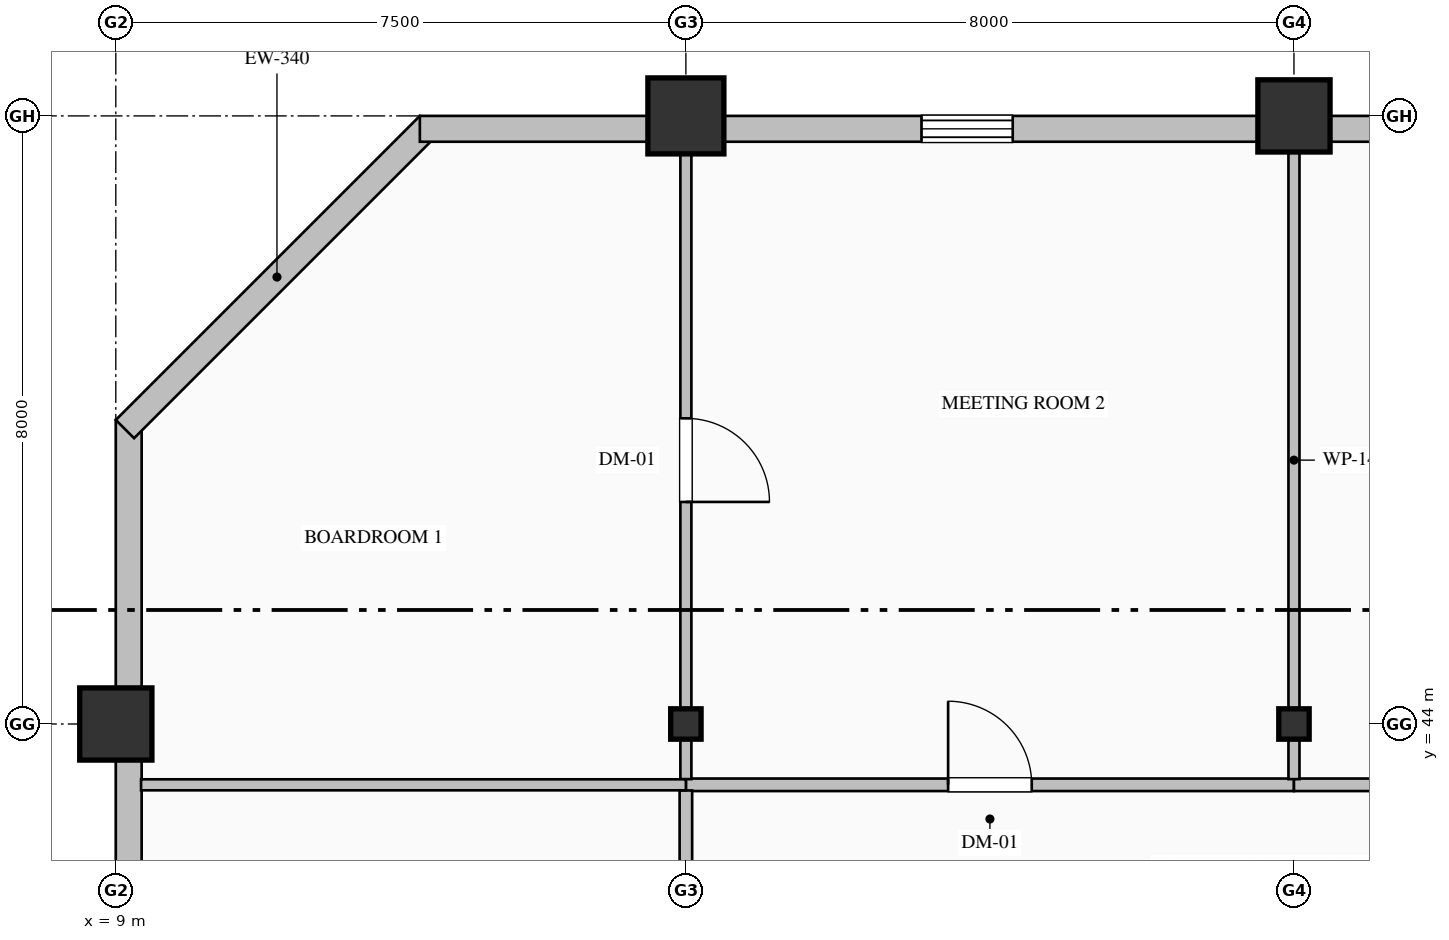
"""IFC4 building model, lengths in metres.
Left out: names, types, materials, properties, quantities, classifications, styles, units other than length and angle.
Written with IfcOpenShell. Run it as: python <this file> out.ifc"""

import sys

from ifc_helpers import new_model, si_unit, direction, frame, frame_2d, origin, origin_2d, place, context, subcontext, project, spatial, rectangle, hollow_rectangle, hollow_circle, i_section, extrude, element, fill, save


model = new_model("IFC4")
c1 = context("Model", 3, precision=1e-05, world=origin(), true_north=direction((0.0, 1.0)))
c2 = subcontext(c1, "Body", "Model", "MODEL_VIEW")
j1 = project(units=[si_unit("LENGTHUNIT", "METRE"), si_unit("PLANEANGLEUNIT", "RADIAN")], contexts=[c1])
p1 = place(None, origin())
s1 = spatial("IfcSite", under=j1, at=p1, CompositionType="ELEMENT")
p2 = place(p1, origin())
s2 = spatial("IfcBuilding", under=s1, at=p2, CompositionType="ELEMENT")
p3 = place(p2, frame((0.0, 0.0, 135.0)))
s3 = spatial("IfcBuildingStorey", under=s2, at=p3, CompositionType="ELEMENT", Elevation=135.0)
p4 = place(p3, frame((9.0, 44.0, 0.0), z_axis=(0.0, 0.0, 1.0), x_axis=(1.0, 0.0, 0.0)))
e1 = element("IfcColumn", 1, at=p4, inside=s3, PredefinedType="COLUMN", context=c2, shape_type="SweptSolid", body=[
    extrude(hollow_rectangle(XDim=0.95, YDim=0.95, WallThickness=0.036, at=origin_2d()), origin(), (0.0, 0.0, 1.0), 4.0),
])
p5 = place(p3, frame((16.5, 44.0, 0.0), z_axis=(0.0, 0.0, 1.0), x_axis=(1.0, 0.0, 0.0)))
e2 = element("IfcColumn", 2, at=p5, inside=s3, PredefinedType="COLUMN", context=c2, shape_type="SweptSolid", body=[
    extrude(i_section(OverallWidth=0.4, OverallDepth=0.4, WebThickness=0.013, FlangeThickness=0.021, FilletRadius=0.022, at=origin_2d()), origin(), (0.0, 0.0, 1.0), 4.0),
])
p6 = place(p3, frame((16.5, 52.0, 0.0), z_axis=(0.0, 0.0, 1.0), x_axis=(1.0, 0.0, 0.0)))
e3 = element("IfcColumn", 3, at=p6, inside=s3, PredefinedType="COLUMN", context=c2, shape_type="SweptSolid", body=[
    extrude(hollow_circle(Radius=0.5, WallThickness=0.036, at=origin_2d()), origin(), (0.0, 0.0, 1.0), 4.0),
])
p7 = place(p3, frame((24.5, 44.0, 0.0), z_axis=(0.0, 0.0, 1.0), x_axis=(1.0, 0.0, 0.0)))
e4 = element("IfcColumn", 4, at=p7, inside=s3, PredefinedType="COLUMN", context=c2, shape_type="SweptSolid", body=[
    extrude(i_section(OverallWidth=0.4, OverallDepth=0.4, WebThickness=0.013, FlangeThickness=0.021, FilletRadius=0.022, at=origin_2d()), origin(), (0.0, 0.0, 1.0), 4.0),
])
p8 = place(p3, frame((24.5, 52.0, 0.0), z_axis=(0.0, 0.0, 1.0), x_axis=(1.0, 0.0, 0.0)))
e5 = element("IfcColumn", 5, at=p8, inside=s3, PredefinedType="COLUMN", context=c2, shape_type="SweptSolid", body=[
    extrude(hollow_rectangle(XDim=0.95, YDim=0.95, WallThickness=0.036, at=origin_2d()), origin(), (0.0, 0.0, 1.0), 4.0),
])
p9 = place(p3, frame((9.17, 32.0, 0.0), z_axis=(0.0, 0.0, 1.0), x_axis=(0.0, 1.0, 0.0)))
e6 = element("IfcWall", 6, at=p9, inside=s3, PredefinedType="SOLIDWALL", context=c2, shape_type="SweptSolid", body=[
    extrude(rectangle(XDim=16.0, YDim=0.34, at=frame_2d((8.0, 0.0))), origin(), (0.0, 0.0, 1.0), 3.265),
])
p10 = place(p9, frame((6.45, 0.0, 0.85)))
e7 = element("IfcOpeningElement", 7, at=p10, cuts=e6, PredefinedType="OPENING", context=c2, shape_type="SweptSolid", body=[
    extrude(rectangle(XDim=1.5, YDim=1.95, at=frame_2d((0.75, 0.975))), frame((0.0, 0.18, 0.0), z_axis=(0.0, -1.0, 0.0), x_axis=(1.0, 0.0, 0.0)), (0.0, 0.0, 1.0), 0.36),
])
p11 = place(p3, frame((9.12, 47.88, 0.0), z_axis=(0.0, 0.0, 1.0), x_axis=(0.707106781187, 0.707106781187, 0.0)))
e8 = element("IfcWall", 8, at=p11, inside=s3, PredefinedType="SOLIDWALL", context=c2, shape_type="SweptSolid", body=[
    extrude(rectangle(XDim=5.657, YDim=0.34, at=frame_2d((2.828, 0.0))), origin(), (0.0, 0.0, 1.0), 3.765),
])
p12 = place(p3, frame((13.0, 51.83, 0.0), z_axis=(0.0, 0.0, 1.0), x_axis=(1.0, 0.0, 0.0)))
e9 = element("IfcWall", 9, at=p12, inside=s3, PredefinedType="SOLIDWALL", context=c2, shape_type="SweptSolid", body=[
    extrude(rectangle(XDim=27.52, YDim=0.34, at=frame_2d((13.76, 0.0))), origin(), (0.0, 0.0, 1.0), 3.265),
])
p13 = place(p12, frame((6.6, 0.0, 0.7)))
e10 = element("IfcOpeningElement", 10, at=p13, cuts=e9, PredefinedType="OPENING", context=c2, shape_type="SweptSolid", body=[
    extrude(rectangle(XDim=1.2, YDim=1.85, at=frame_2d((0.6, 0.925))), frame((0.0, 0.18, 0.0), z_axis=(0.0, -1.0, 0.0), x_axis=(1.0, 0.0, 0.0)), (0.0, 0.0, 1.0), 0.36),
])
p14 = place(p12, frame((13.575, 0.0, 0.85)))
e11 = element("IfcOpeningElement", 11, at=p14, cuts=e9, PredefinedType="OPENING", context=c2, shape_type="SweptSolid", body=[
    extrude(rectangle(XDim=1.65, YDim=1.95, at=frame_2d((0.825, 0.975))), frame((0.0, 0.18, 0.0), z_axis=(0.0, -1.0, 0.0), x_axis=(1.0, 0.0, 0.0)), (0.0, 0.0, 1.0), 0.36),
])
p15 = place(p3, frame((16.5, 43.2, 0.0), z_axis=(0.0, 0.0, 1.0), x_axis=(1.0, 0.0, 0.0)))
e12 = element("IfcWall", 12, at=p15, inside=s3, PredefinedType="PARTITIONING", context=c2, shape_type="SweptSolid", body=[
    extrude(rectangle(XDim=8.0, YDim=0.165, at=frame_2d((4.0, 0.0))), origin(), (0.0, 0.0, 1.0), 3.765),
])
p16 = place(p15, frame((3.45, 0.0, 0.0)))
e13 = element("IfcOpeningElement", 13, at=p16, cuts=e12, PredefinedType="OPENING", context=c2, shape_type="SweptSolid", body=[
    extrude(rectangle(XDim=1.1, YDim=2.2, at=frame_2d((0.55, 1.1))), frame((0.0, 0.093, 0.0), z_axis=(0.0, -1.0, 0.0), x_axis=(1.0, 0.0, 0.0)), (0.0, 0.0, 1.0), 0.185),
])
p17 = place(p3, frame((24.5, 43.2, 0.0), z_axis=(0.0, 0.0, 1.0), x_axis=(1.0, 0.0, 0.0)))
e14 = element("IfcWall", 14, at=p17, inside=s3, PredefinedType="PARTITIONING", context=c2, shape_type="SweptSolid", body=[
    extrude(rectangle(XDim=8.0, YDim=0.165, at=frame_2d((4.0, 0.0))), origin(), (0.0, 0.0, 1.0), 3.765),
])
p18 = place(p17, frame((3.5, 0.0, 0.0)))
e15 = element("IfcOpeningElement", 15, at=p18, cuts=e14, PredefinedType="OPENING", context=c2, shape_type="SweptSolid", body=[
    extrude(rectangle(XDim=1.0, YDim=2.15, at=frame_2d((0.5, 1.075))), frame((0.0, 0.093, 0.0), z_axis=(0.0, -1.0, 0.0), x_axis=(1.0, 0.0, 0.0)), (0.0, 0.0, 1.0), 0.185),
])
p19 = place(p3, frame((16.5, 41.0, 0.0), z_axis=(0.0, 0.0, 1.0), x_axis=(0.0, 1.0, 0.0)))
e16 = element("IfcWall", 16, at=p19, inside=s3, PredefinedType="PARTITIONING", context=c2, shape_type="SweptSolid", body=[
    extrude(rectangle(XDim=2.125, YDim=0.165, at=frame_2d((1.063, 0.0))), origin(), (0.0, 0.0, 1.0), 3.157),
])
p20 = place(p3, frame((16.5, 51.668, 0.0), z_axis=(0.0, 0.0, 1.0), x_axis=(0.0, -1.0, 0.0)))
e17 = element("IfcWall", 17, at=p20, inside=s3, PredefinedType="PARTITIONING", context=c2, shape_type="SweptSolid", body=[
    extrude(rectangle(XDim=8.394, YDim=0.145, at=frame_2d((4.197, 0.0))), origin(), (0.0, 0.0, 1.0), 3.157),
])
p21 = place(p20, frame((3.647, 0.0, 0.0)))
e18 = element("IfcOpeningElement", 18, at=p21, cuts=e17, PredefinedType="OPENING", context=c2, shape_type="SweptSolid", body=[
    extrude(rectangle(XDim=1.1, YDim=2.2, at=frame_2d((0.55, 1.1))), frame((0.0, 0.083, 0.0), z_axis=(0.0, -1.0, 0.0), x_axis=(1.0, 0.0, 0.0)), (0.0, 0.0, 1.0), 0.165),
])
p22 = place(p3, frame((16.5, 43.2, 0.0), z_axis=(0.0, 0.0, 1.0), x_axis=(-1.0, 0.0, 0.0)))
e19 = element("IfcWall", 19, at=p22, inside=s3, PredefinedType="PARTITIONING", context=c2, shape_type="SweptSolid", body=[
    extrude(rectangle(XDim=7.168, YDim=0.145, at=frame_2d((3.584, 0.0))), origin(), (0.0, 0.0, 1.0), 3.765),
])
p23 = place(p3, frame((24.5, 51.668, 0.0), z_axis=(0.0, 0.0, 1.0), x_axis=(0.0, -1.0, 0.0)))
e20 = element("IfcWall", 20, at=p23, inside=s3, PredefinedType="PARTITIONING", context=c2, shape_type="SweptSolid", body=[
    extrude(rectangle(XDim=8.394, YDim=0.145, at=frame_2d((4.197, 0.0))), origin(), (0.0, 0.0, 1.0), 3.157),
])
p24 = place(p13, origin())
e21 = element("IfcWindow", 21, at=p24, inside=s3, PartitioningType="DOUBLE_PANEL_VERTICAL", PredefinedType="WINDOW", context=c2, shape_type="SweptSolid", body=[
    extrude(rectangle(XDim=1.2, YDim=1.85, at=frame_2d((0.6, 0.925))), frame((0.0, 0.15, 0.0), z_axis=(0.0, -1.0, 0.0), x_axis=(1.0, 0.0, 0.0)), (0.0, 0.0, 1.0), 0.06),
])
fill(e10, e21)
p25 = place(p21, origin())
e22 = element("IfcDoor", 22, at=p25, inside=s3, OperationType="SINGLE_SWING_RIGHT", PredefinedType="DOOR", context=c2, shape_type="SweptSolid", body=[
    extrude(rectangle(XDim=1.1, YDim=2.2, at=frame_2d((0.55, 1.1))), frame((0.0, 0.025, 0.0), z_axis=(0.0, -1.0, 0.0), x_axis=(1.0, 0.0, 0.0)), (0.0, 0.0, 1.0), 0.05),
])
fill(e18, e22)
p26 = place(p16, origin())
e23 = element("IfcDoor", 23, at=p26, inside=s3, OperationType="SINGLE_SWING_LEFT", PredefinedType="DOOR", context=c2, shape_type="SweptSolid", body=[
    extrude(rectangle(XDim=1.1, YDim=2.2, at=frame_2d((0.55, 1.1))), frame((0.0, 0.025, 0.0), z_axis=(0.0, -1.0, 0.0), x_axis=(1.0, 0.0, 0.0)), (0.0, 0.0, 1.0), 0.05),
])
fill(e13, e23)
save(model, sys.argv[1])
